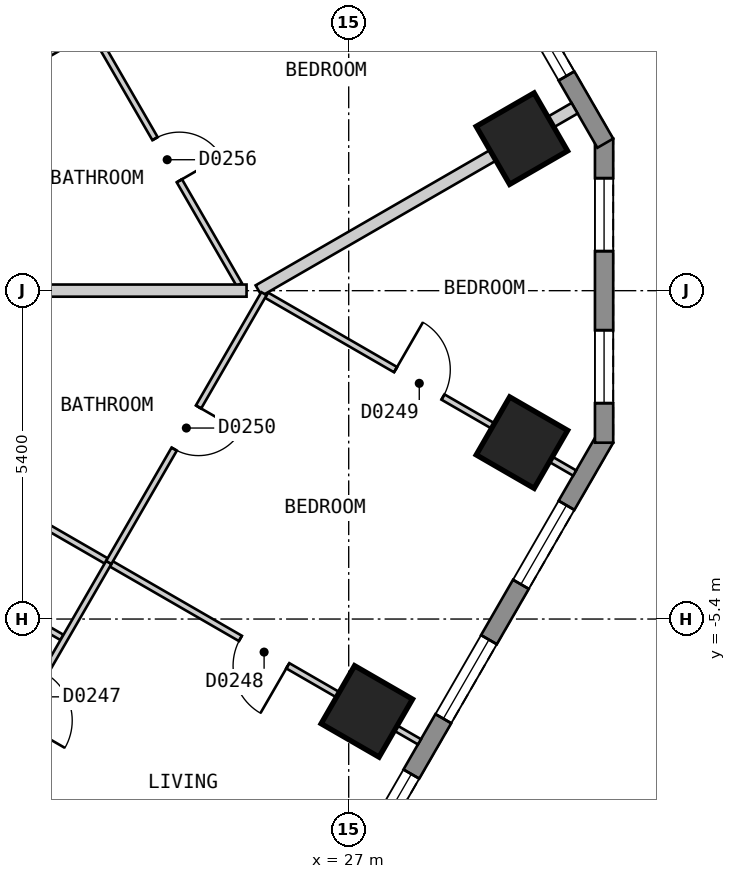
"""IFC4 building model, lengths in metres.
Left out: names, types, materials, properties, quantities, classifications, styles, units other than length and angle.
Written with IfcOpenShell. Run it as: python <this file> out.ifc"""

import sys

from ifc_helpers import new_model, si_unit, direction, frame, frame_2d, origin, origin_2d, place, context, subcontext, project, spatial, polyline, rectangle, outline, extrude, element, fill, save


model = new_model("IFC4")
c1 = context("Model", 3, precision=1e-05, world=origin(), true_north=direction((0.0, 1.0)))
c2 = subcontext(c1, "Body", "Model", "MODEL_VIEW")
j1 = project(units=[si_unit("LENGTHUNIT", "METRE"), si_unit("PLANEANGLEUNIT", "RADIAN")], contexts=[c1])
p1 = place(None, origin())
s1 = spatial("IfcSite", under=j1, at=p1, CompositionType="ELEMENT")
p2 = place(p1, origin())
s2 = spatial("IfcBuilding", under=s1, at=p2, CompositionType="ELEMENT")
p3 = place(p2, frame((0.0, 0.0, 41.4)))
s3 = spatial("IfcBuildingStorey", under=s2, at=p3, CompositionType="ELEMENT", Elevation=41.4)
for number, where, z_axis, x_axis in (
    (1, (27.298, -6.919, 0.0), (0.0, 0.0, 1.0), (0.5, 0.866, 0.0)),
    (2, (29.849, -2.499, 0.0), (0.0, 0.0, 1.0), (0.5, 0.866, 0.0)),
    (3, (29.848, 2.5, 0.0), (0.0, 0.0, 1.0), (-0.5, 0.866, 0.0)),
):
    element("IfcColumn", number, at=place(p3, frame(where, z_axis=z_axis, x_axis=x_axis)), inside=s3, PredefinedType="COLUMN", context=c2, shape_type="SweptSolid", body=[
        extrude(rectangle(XDim=1.1, YDim=1.1, at=origin_2d()), origin(), (0.0, 0.0, 1.0), 3.0),
    ])
p4 = place(p3, frame((17.71, -25.825, 0.0), z_axis=(0.0, 0.0, 1.0), x_axis=(0.500001938803, 0.866024284413, 0.0)))
e4 = element("IfcWall", 4, at=p4, inside=s3, PredefinedType="SOLIDWALL", context=c2, shape_type="SweptSolid", body=[
    extrude(outline(polyline([(0.0, -0.15), (27.02, -0.15), (26.94, 0.15), (0.08, 0.15), (0.0, -0.15)])), origin(), (0.0, 0.0, 1.0), 2.7),
])
p5 = place(p4, frame((1.277, 0.0, 0.15)))
e5 = element("IfcOpeningElement", 5, at=p5, cuts=e4, PredefinedType="OPENING", context=c2, shape_type="SweptSolid", body=[
    extrude(rectangle(XDim=1.5, YDim=2.1, at=frame_2d((0.75, 1.05))), frame((0.0, 0.16, 0.0), z_axis=(0.0, -1.0, 0.0), x_axis=(1.0, 0.0, 0.0)), (0.0, 0.0, 1.0), 0.32),
])
p6 = place(p4, frame((3.829, 0.0, 0.15)))
e6 = element("IfcOpeningElement", 6, at=p6, cuts=e4, PredefinedType="OPENING", context=c2, shape_type="SweptSolid", body=[
    extrude(rectangle(XDim=1.5, YDim=2.1, at=frame_2d((0.75, 1.05))), frame((0.0, 0.16, 0.0), z_axis=(0.0, -1.0, 0.0), x_axis=(1.0, 0.0, 0.0)), (0.0, 0.0, 1.0), 0.32),
])
p7 = place(p4, frame((6.382, 0.0, 0.15)))
e7 = element("IfcOpeningElement", 7, at=p7, cuts=e4, PredefinedType="OPENING", context=c2, shape_type="SweptSolid", body=[
    extrude(rectangle(XDim=1.5, YDim=2.1, at=frame_2d((0.75, 1.05))), frame((0.0, 0.16, 0.0), z_axis=(0.0, -1.0, 0.0), x_axis=(1.0, 0.0, 0.0)), (0.0, 0.0, 1.0), 0.32),
])
p8 = place(p4, frame((8.933, 0.0, 0.15)))
e8 = element("IfcOpeningElement", 8, at=p8, cuts=e4, PredefinedType="OPENING", context=c2, shape_type="SweptSolid", body=[
    extrude(rectangle(XDim=1.5, YDim=2.1, at=frame_2d((0.75, 1.05))), frame((0.0, 0.16, 0.0), z_axis=(0.0, -1.0, 0.0), x_axis=(1.0, 0.0, 0.0)), (0.0, 0.0, 1.0), 0.32),
])
p9 = place(p4, frame((11.485, 0.0, 0.15)))
e9 = element("IfcOpeningElement", 9, at=p9, cuts=e4, PredefinedType="OPENING", context=c2, shape_type="SweptSolid", body=[
    extrude(rectangle(XDim=1.5, YDim=2.1, at=frame_2d((0.75, 1.05))), frame((0.0, 0.16, 0.0), z_axis=(0.0, -1.0, 0.0), x_axis=(1.0, 0.0, 0.0)), (0.0, 0.0, 1.0), 0.32),
])
p10 = place(p4, frame((14.037, 0.0, 0.15)))
e10 = element("IfcOpeningElement", 10, at=p10, cuts=e4, PredefinedType="OPENING", context=c2, shape_type="SweptSolid", body=[
    extrude(rectangle(XDim=1.5, YDim=2.1, at=frame_2d((0.75, 1.05))), frame((0.0, 0.16, 0.0), z_axis=(0.0, -1.0, 0.0), x_axis=(1.0, 0.0, 0.0)), (0.0, 0.0, 1.0), 0.32),
])
p11 = place(p4, frame((16.589, 0.0, 0.15)))
e11 = element("IfcOpeningElement", 11, at=p11, cuts=e4, PredefinedType="OPENING", context=c2, shape_type="SweptSolid", body=[
    extrude(rectangle(XDim=1.5, YDim=2.1, at=frame_2d((0.75, 1.05))), frame((0.0, 0.16, 0.0), z_axis=(0.0, -1.0, 0.0), x_axis=(1.0, 0.0, 0.0)), (0.0, 0.0, 1.0), 0.32),
])
p12 = place(p4, frame((19.141, 0.0, 0.15)))
e12 = element("IfcOpeningElement", 12, at=p12, cuts=e4, PredefinedType="OPENING", context=c2, shape_type="SweptSolid", body=[
    extrude(rectangle(XDim=1.5, YDim=2.1, at=frame_2d((0.75, 1.05))), frame((0.0, 0.16, 0.0), z_axis=(0.0, -1.0, 0.0), x_axis=(1.0, 0.0, 0.0)), (0.0, 0.0, 1.0), 0.32),
])
p13 = place(p4, frame((21.693, 0.0, 0.15)))
e13 = element("IfcOpeningElement", 13, at=p13, cuts=e4, PredefinedType="OPENING", context=c2, shape_type="SweptSolid", body=[
    extrude(rectangle(XDim=1.5, YDim=2.1, at=frame_2d((0.75, 1.05))), frame((0.0, 0.16, 0.0), z_axis=(0.0, -1.0, 0.0), x_axis=(1.0, 0.0, 0.0)), (0.0, 0.0, 1.0), 0.32),
])
p14 = place(p4, frame((24.244, 0.0, 0.15)))
e14 = element("IfcOpeningElement", 14, at=p14, cuts=e4, PredefinedType="OPENING", context=c2, shape_type="SweptSolid", body=[
    extrude(rectangle(XDim=1.5, YDim=2.1, at=frame_2d((0.75, 1.05))), frame((0.0, 0.16, 0.0), z_axis=(0.0, -1.0, 0.0), x_axis=(1.0, 0.0, 0.0)), (0.0, 0.0, 1.0), 0.32),
])
p15 = place(p3, frame((31.2, -2.5, 0.0), z_axis=(0.0, 0.0, 1.0), x_axis=(0.0, 1.0, 0.0)))
e15 = element("IfcWall", 15, at=p15, inside=s3, PredefinedType="SOLIDWALL", context=c2, shape_type="SweptSolid", body=[
    extrude(outline(polyline([(0.0, -0.15), (5.0, -0.15), (4.92, 0.15), (0.08, 0.15), (0.0, -0.15)])), origin(), (0.0, 0.0, 1.0), 2.7),
])
p16 = place(p15, frame((0.65, 0.0, 0.15)))
e16 = element("IfcOpeningElement", 16, at=p16, cuts=e15, PredefinedType="OPENING", context=c2, shape_type="SweptSolid", body=[
    extrude(rectangle(XDim=1.2, YDim=2.1, at=frame_2d((0.6, 1.05))), frame((0.0, 0.16, 0.0), z_axis=(0.0, -1.0, 0.0), x_axis=(1.0, 0.0, 0.0)), (0.0, 0.0, 1.0), 0.32),
])
p17 = place(p15, frame((3.15, 0.0, 0.15)))
e17 = element("IfcOpeningElement", 17, at=p17, cuts=e15, PredefinedType="OPENING", context=c2, shape_type="SweptSolid", body=[
    extrude(rectangle(XDim=1.2, YDim=2.1, at=frame_2d((0.6, 1.05))), frame((0.0, 0.16, 0.0), z_axis=(0.0, -1.0, 0.0), x_axis=(1.0, 0.0, 0.0)), (0.0, 0.0, 1.0), 0.32),
])
p18 = place(p3, frame((31.22, 2.425, 0.0), z_axis=(0.0, 0.0, 1.0), x_axis=(-0.500001938803, 0.866024284413, 0.0)))
e18 = element("IfcWall", 18, at=p18, inside=s3, PredefinedType="SOLIDWALL", context=c2, shape_type="SweptSolid", body=[
    extrude(outline(polyline([(0.0, -0.15), (27.02, -0.15), (26.94, 0.15), (0.08, 0.15), (0.0, -0.15)])), origin(), (0.0, 0.0, 1.0), 2.7),
])
p19 = place(p18, frame((1.277, 0.0, 0.15)))
e19 = element("IfcOpeningElement", 19, at=p19, cuts=e18, PredefinedType="OPENING", context=c2, shape_type="SweptSolid", body=[
    extrude(rectangle(XDim=1.5, YDim=2.1, at=frame_2d((0.75, 1.05))), frame((0.0, 0.16, 0.0), z_axis=(0.0, -1.0, 0.0), x_axis=(1.0, 0.0, 0.0)), (0.0, 0.0, 1.0), 0.32),
])
p20 = place(p18, frame((3.829, 0.0, 0.15)))
e20 = element("IfcOpeningElement", 20, at=p20, cuts=e18, PredefinedType="OPENING", context=c2, shape_type="SweptSolid", body=[
    extrude(rectangle(XDim=1.5, YDim=2.1, at=frame_2d((0.75, 1.05))), frame((0.0, 0.16, 0.0), z_axis=(0.0, -1.0, 0.0), x_axis=(1.0, 0.0, 0.0)), (0.0, 0.0, 1.0), 0.32),
])
p21 = place(p18, frame((6.382, 0.0, 0.15)))
e21 = element("IfcOpeningElement", 21, at=p21, cuts=e18, PredefinedType="OPENING", context=c2, shape_type="SweptSolid", body=[
    extrude(rectangle(XDim=1.5, YDim=2.1, at=frame_2d((0.75, 1.05))), frame((0.0, 0.16, 0.0), z_axis=(0.0, -1.0, 0.0), x_axis=(1.0, 0.0, 0.0)), (0.0, 0.0, 1.0), 0.32),
])
p22 = place(p18, frame((8.933, 0.0, 0.15)))
e22 = element("IfcOpeningElement", 22, at=p22, cuts=e18, PredefinedType="OPENING", context=c2, shape_type="SweptSolid", body=[
    extrude(rectangle(XDim=1.5, YDim=2.1, at=frame_2d((0.75, 1.05))), frame((0.0, 0.16, 0.0), z_axis=(0.0, -1.0, 0.0), x_axis=(1.0, 0.0, 0.0)), (0.0, 0.0, 1.0), 0.32),
])
p23 = place(p18, frame((11.485, 0.0, 0.15)))
e23 = element("IfcOpeningElement", 23, at=p23, cuts=e18, PredefinedType="OPENING", context=c2, shape_type="SweptSolid", body=[
    extrude(rectangle(XDim=1.5, YDim=2.1, at=frame_2d((0.75, 1.05))), frame((0.0, 0.16, 0.0), z_axis=(0.0, -1.0, 0.0), x_axis=(1.0, 0.0, 0.0)), (0.0, 0.0, 1.0), 0.32),
])
p24 = place(p18, frame((14.037, 0.0, 0.15)))
e24 = element("IfcOpeningElement", 24, at=p24, cuts=e18, PredefinedType="OPENING", context=c2, shape_type="SweptSolid", body=[
    extrude(rectangle(XDim=1.5, YDim=2.1, at=frame_2d((0.75, 1.05))), frame((0.0, 0.16, 0.0), z_axis=(0.0, -1.0, 0.0), x_axis=(1.0, 0.0, 0.0)), (0.0, 0.0, 1.0), 0.32),
])
p25 = place(p18, frame((16.589, 0.0, 0.15)))
e25 = element("IfcOpeningElement", 25, at=p25, cuts=e18, PredefinedType="OPENING", context=c2, shape_type="SweptSolid", body=[
    extrude(rectangle(XDim=1.5, YDim=2.1, at=frame_2d((0.75, 1.05))), frame((0.0, 0.16, 0.0), z_axis=(0.0, -1.0, 0.0), x_axis=(1.0, 0.0, 0.0)), (0.0, 0.0, 1.0), 0.32),
])
p26 = place(p18, frame((19.141, 0.0, 0.15)))
e26 = element("IfcOpeningElement", 26, at=p26, cuts=e18, PredefinedType="OPENING", context=c2, shape_type="SweptSolid", body=[
    extrude(rectangle(XDim=1.5, YDim=2.1, at=frame_2d((0.75, 1.05))), frame((0.0, 0.16, 0.0), z_axis=(0.0, -1.0, 0.0), x_axis=(1.0, 0.0, 0.0)), (0.0, 0.0, 1.0), 0.32),
])
p27 = place(p18, frame((21.693, 0.0, 0.15)))
e27 = element("IfcOpeningElement", 27, at=p27, cuts=e18, PredefinedType="OPENING", context=c2, shape_type="SweptSolid", body=[
    extrude(rectangle(XDim=1.5, YDim=2.1, at=frame_2d((0.75, 1.05))), frame((0.0, 0.16, 0.0), z_axis=(0.0, -1.0, 0.0), x_axis=(1.0, 0.0, 0.0)), (0.0, 0.0, 1.0), 0.32),
])
p28 = place(p18, frame((24.244, 0.0, 0.15)))
e28 = element("IfcOpeningElement", 28, at=p28, cuts=e18, PredefinedType="OPENING", context=c2, shape_type="SweptSolid", body=[
    extrude(rectangle(XDim=1.5, YDim=2.1, at=frame_2d((0.75, 1.05))), frame((0.0, 0.16, 0.0), z_axis=(0.0, -1.0, 0.0), x_axis=(1.0, 0.0, 0.0)), (0.0, 0.0, 1.0), 0.32),
])
p29 = place(p3, frame((22.796, 4.264, 0.0), z_axis=(0.0, 0.0, 1.0), x_axis=(0.500099052605, -0.865968208183, 0.0)))
e29 = element("IfcWall", 29, at=p29, inside=s3, PredefinedType="PARTITIONING", context=c2, shape_type="SweptSolid", body=[
    extrude(rectangle(XDim=4.807, YDim=0.1, at=frame_2d((2.404, 0.0))), origin(), (0.0, 0.0, 1.0), 2.7),
])
p30 = place(p29, frame((2.037, 0.0, 0.0)))
e30 = element("IfcOpeningElement", 30, at=p30, cuts=e29, PredefinedType="OPENING", context=c2, shape_type="SweptSolid", body=[
    extrude(rectangle(XDim=0.8, YDim=2.1, at=frame_2d((0.4, 1.05))), frame((0.0, 0.06, 0.0), z_axis=(0.0, -1.0, 0.0), x_axis=(1.0, 0.0, 0.0)), (0.0, 0.0, 1.0), 0.12),
])
p31 = place(p3, frame((18.777, -3.677, 0.0), z_axis=(0.0, 0.0, 1.0), x_axis=(0.866000843773, -0.500042536776, 0.0)))
e31 = element("IfcWall", 31, at=p31, inside=s3, PredefinedType="PARTITIONING", context=c2, shape_type="SweptSolid", body=[
    extrude(rectangle(XDim=4.05, YDim=0.1, at=frame_2d((2.025, 0.0))), origin(), (0.0, 0.0, 1.0), 2.7),
])
p32 = place(p31, frame((1.55, 0.0, 0.0)))
e32 = element("IfcOpeningElement", 32, at=p32, cuts=e31, PredefinedType="OPENING", context=c2, shape_type="SweptSolid", body=[
    extrude(rectangle(XDim=0.9, YDim=2.1, at=frame_2d((0.45, 1.05))), frame((0.0, 0.06, 0.0), z_axis=(0.0, -1.0, 0.0), x_axis=(1.0, 0.0, 0.0)), (0.0, 0.0, 1.0), 0.12),
])
p33 = place(p3, frame((19.503, -2.419, 0.0), z_axis=(0.0, 0.0, 1.0), x_axis=(0.866047370643, -0.499961950354, 0.0)))
e33 = element("IfcWall", 33, at=p33, inside=s3, PredefinedType="PARTITIONING", context=c2, shape_type="SweptSolid", body=[
    extrude(rectangle(XDim=10.001, YDim=0.1, at=frame_2d((5.0, 0.0))), origin(), (0.0, 0.0, 1.0), 2.7),
])
p34 = place(p33, frame((6.6, 0.0, 0.0)))
e34 = element("IfcOpeningElement", 34, at=p34, cuts=e33, PredefinedType="OPENING", context=c2, shape_type="SweptSolid", body=[
    extrude(rectangle(XDim=0.9, YDim=2.1, at=frame_2d((0.45, 1.05))), frame((0.0, 0.06, 0.0), z_axis=(0.0, -1.0, 0.0), x_axis=(1.0, 0.0, 0.0)), (0.0, 0.0, 1.0), 0.12),
])
p35 = place(p3, frame((25.649, -0.074, 0.0), z_axis=(0.0, 0.0, 1.0), x_axis=(0.866059819573, -0.499940385368, 0.0)))
e35 = element("IfcWall", 35, at=p35, inside=s3, PredefinedType="PARTITIONING", context=c2, shape_type="SweptSolid", body=[
    extrude(rectangle(XDim=5.851, YDim=0.1, at=frame_2d((2.925, 0.0))), origin(), (0.0, 0.0, 1.0), 2.7),
])
p36 = place(p35, frame((2.45, 0.0, 0.0)))
e36 = element("IfcOpeningElement", 36, at=p36, cuts=e35, PredefinedType="OPENING", context=c2, shape_type="SweptSolid", body=[
    extrude(rectangle(XDim=0.9, YDim=2.1, at=frame_2d((0.45, 1.05))), frame((0.0, 0.06, 0.0), z_axis=(0.0, -1.0, 0.0), x_axis=(1.0, 0.0, 0.0)), (0.0, 0.0, 1.0), 0.12),
])
p37 = place(p3, frame((20.978, -8.065, 0.0), z_axis=(0.0, 0.0, 1.0), x_axis=(0.499965068118, 0.866045570776, 0.0)))
e37 = element("IfcWall", 37, at=p37, inside=s3, PredefinedType="PARTITIONING", context=c2, shape_type="SweptSolid", body=[
    extrude(rectangle(XDim=4.152, YDim=0.1, at=frame_2d((2.076, 0.0))), origin(), (0.0, 0.0, 1.0), 2.7),
])
p38 = place(p37, frame((1.15, 0.0, 0.0)))
e38 = element("IfcOpeningElement", 38, at=p38, cuts=e37, PredefinedType="OPENING", context=c2, shape_type="SweptSolid", body=[
    extrude(rectangle(XDim=0.9, YDim=2.1, at=frame_2d((0.45, 1.05))), frame((0.0, 0.06, 0.0), z_axis=(0.0, -1.0, 0.0), x_axis=(1.0, 0.0, 0.0)), (0.0, 0.0, 1.0), 0.12),
])
p39 = place(p3, frame((19.503, 2.421, 0.0), z_axis=(0.0, 0.0, 1.0), x_axis=(0.866065245018, 0.499930986609, 0.0)))
e39 = element("IfcWall", 39, at=p39, inside=s3, PredefinedType="PARTITIONING", context=c2, shape_type="SweptSolid", body=[
    extrude(rectangle(XDim=10.0, YDim=0.1, at=frame_2d((5.0, 0.0))), origin(), (0.0, 0.0, 1.0), 2.7),
])
p40 = place(p39, frame((4.932, 0.0, 0.0)))
e40 = element("IfcOpeningElement", 40, at=p40, cuts=e39, PredefinedType="OPENING", context=c2, shape_type="SweptSolid", body=[
    extrude(rectangle(XDim=0.9, YDim=2.1, at=frame_2d((0.45, 1.05))), frame((0.0, 0.06, 0.0), z_axis=(0.0, -1.0, 0.0), x_axis=(1.0, 0.0, 0.0)), (0.0, 0.0, 1.0), 0.12),
])
p41 = place(p3, frame((16.916, -6.819, 0.0), z_axis=(0.0, 0.0, 1.0), x_axis=(0.866028876723, -0.499993984646, 0.0)))
e41 = element("IfcWall", 41, at=p41, inside=s3, PredefinedType="PARTITIONING", context=c2, shape_type="SweptSolid", body=[
    extrude(rectangle(XDim=10.04, YDim=0.2, at=frame_2d((5.02, 0.0))), origin(), (0.0, 0.0, 1.0), 2.7),
])
p42 = place(p3, frame((20.784, 0.001, 0.0), z_axis=(0.0, 0.0, 1.0), x_axis=(1.0, 0.0, 0.0)))
e42 = element("IfcWall", 42, at=p42, inside=s3, PredefinedType="PARTITIONING", context=c2, shape_type="SweptSolid", body=[
    extrude(rectangle(XDim=4.536, YDim=0.2, at=frame_2d((2.268, 0.0))), origin(), (0.0, 0.0, 1.0), 2.7),
])
p43 = place(p3, frame((25.519, 0.001, 0.0), z_axis=(0.0, 0.0, 1.0), x_axis=(0.86609140076, 0.499885672459, 0.0)))
e43 = element("IfcWall", 43, at=p43, inside=s3, PredefinedType="PARTITIONING", context=c2, shape_type="SweptSolid", body=[
    extrude(rectangle(XDim=6.0, YDim=0.2, at=frame_2d((3.0, 0.0))), origin(), (0.0, 0.0, 1.0), 2.7),
])
p44 = place(p3, frame((23.054, -4.469, 0.0), z_axis=(0.0, 0.0, 1.0), x_axis=(0.500023345639, 0.866011924754, 0.0)))
e44 = element("IfcWall", 44, at=p44, inside=s3, PredefinedType="PARTITIONING", context=c2, shape_type="SweptSolid", body=[
    extrude(rectangle(XDim=5.104, YDim=0.1, at=frame_2d((2.552, 0.0))), origin(), (0.0, 0.0, 1.0), 2.7),
])
p45 = place(p44, frame((2.152, 0.0, 0.0)))
e45 = element("IfcOpeningElement", 45, at=p45, cuts=e44, PredefinedType="OPENING", context=c2, shape_type="SweptSolid", body=[
    extrude(rectangle(XDim=0.8, YDim=2.1, at=frame_2d((0.4, 1.05))), frame((0.0, 0.06, 0.0), z_axis=(0.0, -1.0, 0.0), x_axis=(1.0, 0.0, 0.0)), (0.0, 0.0, 1.0), 0.12),
])
p46 = place(p12, origin())
e46 = element("IfcWindow", 46, at=p46, inside=s3, PartitioningType="SINGLE_PANEL", PredefinedType="WINDOW", context=c2, shape_type="SweptSolid", body=[
    extrude(rectangle(XDim=1.5, YDim=2.1, at=frame_2d((0.75, 1.05))), frame((0.0, 0.03, 0.0), z_axis=(0.0, -1.0, 0.0), x_axis=(1.0, 0.0, 0.0)), (0.0, 0.0, 1.0), 0.06),
])
fill(e12, e46)
p47 = place(p13, origin())
e47 = element("IfcWindow", 47, at=p47, inside=s3, PartitioningType="SINGLE_PANEL", PredefinedType="WINDOW", context=c2, shape_type="SweptSolid", body=[
    extrude(rectangle(XDim=1.5, YDim=2.1, at=frame_2d((0.75, 1.05))), frame((0.0, 0.03, 0.0), z_axis=(0.0, -1.0, 0.0), x_axis=(1.0, 0.0, 0.0)), (0.0, 0.0, 1.0), 0.06),
])
fill(e13, e47)
p48 = place(p14, origin())
e48 = element("IfcWindow", 48, at=p48, inside=s3, PartitioningType="SINGLE_PANEL", PredefinedType="WINDOW", context=c2, shape_type="SweptSolid", body=[
    extrude(rectangle(XDim=1.5, YDim=2.1, at=frame_2d((0.75, 1.05))), frame((0.0, 0.03, 0.0), z_axis=(0.0, -1.0, 0.0), x_axis=(1.0, 0.0, 0.0)), (0.0, 0.0, 1.0), 0.06),
])
fill(e14, e48)
p49 = place(p16, origin())
e49 = element("IfcWindow", 49, at=p49, inside=s3, PartitioningType="SINGLE_PANEL", PredefinedType="WINDOW", context=c2, shape_type="SweptSolid", body=[
    extrude(rectangle(XDim=1.2, YDim=2.1, at=frame_2d((0.6, 1.05))), frame((0.0, 0.03, 0.0), z_axis=(0.0, -1.0, 0.0), x_axis=(1.0, 0.0, 0.0)), (0.0, 0.0, 1.0), 0.06),
])
fill(e16, e49)
p50 = place(p17, origin())
e50 = element("IfcWindow", 50, at=p50, inside=s3, PartitioningType="SINGLE_PANEL", PredefinedType="WINDOW", context=c2, shape_type="SweptSolid", body=[
    extrude(rectangle(XDim=1.2, YDim=2.1, at=frame_2d((0.6, 1.05))), frame((0.0, 0.03, 0.0), z_axis=(0.0, -1.0, 0.0), x_axis=(1.0, 0.0, 0.0)), (0.0, 0.0, 1.0), 0.06),
])
fill(e17, e50)
p51 = place(p19, origin())
e51 = element("IfcWindow", 51, at=p51, inside=s3, PartitioningType="SINGLE_PANEL", PredefinedType="WINDOW", context=c2, shape_type="SweptSolid", body=[
    extrude(rectangle(XDim=1.5, YDim=2.1, at=frame_2d((0.75, 1.05))), frame((0.0, 0.03, 0.0), z_axis=(0.0, -1.0, 0.0), x_axis=(1.0, 0.0, 0.0)), (0.0, 0.0, 1.0), 0.06),
])
fill(e19, e51)
p52 = place(p34, origin())
e52 = element("IfcDoor", 52, at=p52, inside=s3, OperationType="SINGLE_SWING_RIGHT", PredefinedType="DOOR", context=c2, shape_type="SweptSolid", body=[
    extrude(rectangle(XDim=0.9, YDim=2.1, at=frame_2d((0.45, 1.05))), frame((0.0, 0.025, 0.0), z_axis=(0.0, -1.0, 0.0), x_axis=(1.0, 0.0, 0.0)), (0.0, 0.0, 1.0), 0.05),
])
fill(e34, e52)
p53 = place(p36, origin())
e53 = element("IfcDoor", 53, at=p53, inside=s3, OperationType="SINGLE_SWING_LEFT", PredefinedType="DOOR", context=c2, shape_type="SweptSolid", body=[
    extrude(rectangle(XDim=0.9, YDim=2.1, at=frame_2d((0.45, 1.05))), frame((0.0, 0.025, 0.0), z_axis=(0.0, -1.0, 0.0), x_axis=(1.0, 0.0, 0.0)), (0.0, 0.0, 1.0), 0.05),
])
fill(e36, e53)
p54 = place(p45, origin())
e54 = element("IfcDoor", 54, at=p54, inside=s3, OperationType="SINGLE_SWING_RIGHT", PredefinedType="DOOR", context=c2, shape_type="SweptSolid", body=[
    extrude(rectangle(XDim=0.8, YDim=2.1, at=frame_2d((0.4, 1.05))), frame((0.0, 0.025, 0.0), z_axis=(0.0, -1.0, 0.0), x_axis=(1.0, 0.0, 0.0)), (0.0, 0.0, 1.0), 0.05),
])
fill(e45, e54)
p55 = place(p30, origin())
e55 = element("IfcDoor", 55, at=p55, inside=s3, OperationType="SINGLE_SWING_RIGHT", PredefinedType="DOOR", context=c2, shape_type="SweptSolid", body=[
    extrude(rectangle(XDim=0.8, YDim=2.1, at=frame_2d((0.4, 1.05))), frame((0.0, 0.025, 0.0), z_axis=(0.0, -1.0, 0.0), x_axis=(1.0, 0.0, 0.0)), (0.0, 0.0, 1.0), 0.05),
])
fill(e30, e55)
save(model, sys.argv[1])
